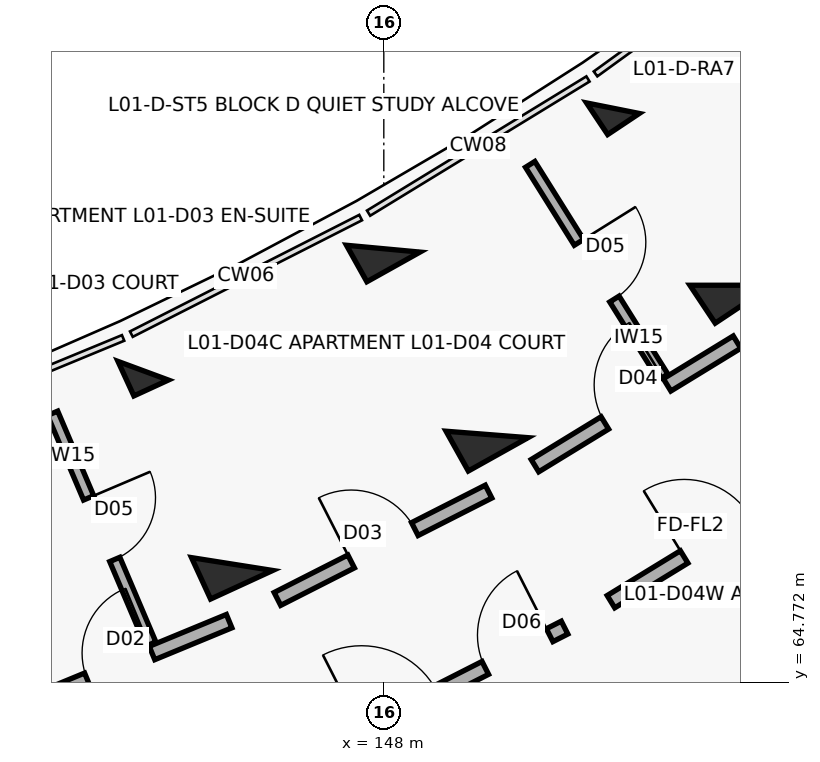
"""IFC4 building model, lengths in metres.
Left out: names, types, materials, properties, quantities, classifications, styles, units other than length and angle.
Written with IfcOpenShell. Run it as: python <this file> out.ifc"""

import sys

from ifc_helpers import new_model, si_unit, direction, frame, frame_2d, origin, origin_2d, place, context, subcontext, project, spatial, rectangle, extrude, element, fill, save


model = new_model("IFC4")
c1 = context("Model", 3, precision=1e-05, world=origin(), true_north=direction((0.0, 1.0)))
c2 = subcontext(c1, "Body", "Model", "MODEL_VIEW")
j1 = project(units=[si_unit("LENGTHUNIT", "METRE"), si_unit("PLANEANGLEUNIT", "RADIAN")], contexts=[c1])
p1 = place(None, origin())
s1 = spatial("IfcSite", under=j1, at=p1, CompositionType="ELEMENT")
p2 = place(p1, origin())
s2 = spatial("IfcBuilding", under=s1, at=p2, CompositionType="ELEMENT")
p3 = place(p2, frame((0.0, 0.0, 4.5)))
s3 = spatial("IfcBuildingStorey", under=s2, at=p3, CompositionType="ELEMENT", Elevation=4.5)
p4 = place(p3, frame((144.834, 68.868, 0.0), z_axis=(0.0, 0.0, 1.0), x_axis=(0.417867073801, -0.908508177527, 0.0)))
e1 = element("IfcColumn", 1, at=p4, inside=s3, PredefinedType="COLUMN", context=c2, shape_type="SweptSolid", body=[
    extrude(rectangle(XDim=0.5, YDim=0.5, at=origin_2d()), origin(), (0.0, 0.0, 1.0), 3.6),
])
p5 = place(p3, frame((146.004, 66.324, 0.0), z_axis=(0.0, 0.0, 1.0), x_axis=(0.417867073801, -0.908508177527, 0.0)))
e2 = element("IfcColumn", 2, at=p5, inside=s3, PredefinedType="COLUMN", context=c2, shape_type="SweptSolid", body=[
    extrude(rectangle(XDim=0.6, YDim=0.9, at=origin_2d()), origin(), (0.0, 0.0, 1.0), 3.6),
])
p6 = place(p3, frame((147.992, 70.474, 0.0), z_axis=(0.0, 0.0, 1.0), x_axis=(0.487859659139, -0.87292207727, 0.0)))
e3 = element("IfcColumn", 3, at=p6, inside=s3, PredefinedType="COLUMN", context=c2, shape_type="SweptSolid", body=[
    extrude(rectangle(XDim=0.55, YDim=0.8, at=origin_2d()), origin(), (0.0, 0.0, 1.0), 3.6),
])
p7 = place(p3, frame((149.358, 68.03, 0.0), z_axis=(0.0, 0.0, 1.0), x_axis=(0.487859659139, -0.87292207727, 0.0)))
e4 = element("IfcColumn", 4, at=p7, inside=s3, PredefinedType="COLUMN", context=c2, shape_type="SweptSolid", body=[
    extrude(rectangle(XDim=0.6, YDim=0.9, at=origin_2d()), origin(), (0.0, 0.0, 1.0), 3.6),
])
p8 = place(p3, frame((151.015, 72.322, 0.0), z_axis=(0.0, 0.0, 1.0), x_axis=(0.554844427448, -0.83195412213, 0.0)))
e5 = element("IfcColumn", 5, at=p8, inside=s3, PredefinedType="COLUMN", context=c2, shape_type="SweptSolid", body=[
    extrude(rectangle(XDim=0.5, YDim=0.5, at=origin_2d()), origin(), (0.0, 0.0, 1.0), 3.6),
])
p9 = place(p3, frame((152.568, 69.993, 0.0), z_axis=(0.0, 0.0, 1.0), x_axis=(0.554844427448, -0.83195412213, 0.0)))
e6 = element("IfcColumn", 6, at=p9, inside=s3, PredefinedType="COLUMN", context=c2, shape_type="SweptSolid", body=[
    extrude(rectangle(XDim=0.6, YDim=0.9, at=origin_2d()), origin(), (0.0, 0.0, 1.0), 3.6),
])
p10 = place(p3, frame((143.085, 64.383, 0.0), z_axis=(0.0, 0.0, 1.0), x_axis=(0.924213340202, 0.381876553081, 0.0)))
e7 = element("IfcWall", 7, at=p10, inside=s3, PredefinedType="SOLIDWALL", context=c2, shape_type="SweptSolid", body=[
    extrude(rectangle(XDim=3.116, YDim=0.19, at=frame_2d((1.558, 0.0))), origin(), (0.0, 0.0, 1.0), 2.58),
])
p11 = place(p10, frame((1.098, 0.0, 0.0)))
e8 = element("IfcOpeningElement", 8, at=p11, cuts=e7, PredefinedType="OPENING", context=c2, shape_type="SweptSolid", body=[
    extrude(rectangle(XDim=0.92, YDim=2.1, at=frame_2d((0.46, 1.05))), frame((0.0, 0.105, 0.0), z_axis=(0.0, -1.0, 0.0), x_axis=(1.0, 0.0, 0.0)), (0.0, 0.0, 1.0), 0.21),
])
p12 = place(p3, frame((143.643, 68.308, 0.0), z_axis=(0.0, 0.0, 1.0), x_axis=(0.391203300693, -0.920304285292, 0.0)))
e9 = element("IfcWall", 9, at=p12, inside=s3, PredefinedType="PARTITIONING", context=c2, shape_type="SweptSolid", body=[
    extrude(rectangle(XDim=3.3, YDim=0.145, at=frame_2d((1.65, 0.0))), origin(), (0.0, 0.0, 1.0), 2.58),
])
p13 = place(p12, frame((1.21, 0.0, 0.0)))
e10 = element("IfcOpeningElement", 10, at=p13, cuts=e9, PredefinedType="OPENING", context=c2, shape_type="SweptSolid", body=[
    extrude(rectangle(XDim=0.88, YDim=2.1, at=frame_2d((0.44, 1.05))), frame((0.0, 0.083, 0.0), z_axis=(0.0, -1.0, 0.0), x_axis=(1.0, 0.0, 0.0)), (0.0, 0.0, 1.0), 0.165),
])
p14 = place(p3, frame((147.457, 64.003, 0.0), z_axis=(0.0, 0.0, 1.0), x_axis=(0.891412167565, 0.45319349898, 0.0)))
e11 = element("IfcWall", 11, at=p14, inside=s3, PredefinedType="SOLIDWALL", context=c2, shape_type="SweptSolid", body=[
    extrude(rectangle(XDim=3.277, YDim=0.19, at=frame_2d((1.639, 0.0))), origin(), (0.0, 0.0, 1.0), 2.58),
])
p15 = place(p14, frame((0.28, 0.0, 0.0)))
e12 = element("IfcOpeningElement", 12, at=p15, cuts=e11, PredefinedType="OPENING", context=c2, shape_type="SweptSolid", body=[
    extrude(rectangle(XDim=1.12, YDim=2.15, at=frame_2d((0.56, 1.075))), frame((0.0, 0.105, 0.0), z_axis=(0.0, -1.0, 0.0), x_axis=(1.0, 0.0, 0.0)), (0.0, 0.0, 1.0), 0.21),
])
p16 = place(p14, frame((2.107, 0.0, 0.0)))
e13 = element("IfcOpeningElement", 13, at=p16, cuts=e11, PredefinedType="OPENING", context=c2, shape_type="SweptSolid", body=[
    extrude(rectangle(XDim=0.95, YDim=2.1, at=frame_2d((0.475, 1.05))), frame((0.0, 0.105, 0.0), z_axis=(0.0, -1.0, 0.0), x_axis=(1.0, 0.0, 0.0)), (0.0, 0.0, 1.0), 0.21),
])
p17 = place(p3, frame((146.6, 65.865, 0.0), z_axis=(0.0, 0.0, 1.0), x_axis=(0.891414101388, 0.453189695212, 0.0)))
e14 = element("IfcWall", 14, at=p17, inside=s3, PredefinedType="SOLIDWALL", context=c2, shape_type="SweptSolid", body=[
    extrude(rectangle(XDim=3.116, YDim=0.19, at=frame_2d((1.558, 0.0))), origin(), (0.0, 0.0, 1.0), 2.58),
])
p18 = place(p17, frame((1.088, 0.0, 0.0)))
e15 = element("IfcOpeningElement", 15, at=p18, cuts=e14, PredefinedType="OPENING", context=c2, shape_type="SweptSolid", body=[
    extrude(rectangle(XDim=0.94, YDim=2.1, at=frame_2d((0.47, 1.05))), frame((0.0, 0.105, 0.0), z_axis=(0.0, -1.0, 0.0), x_axis=(1.0, 0.0, 0.0)), (0.0, 0.0, 1.0), 0.21),
])
p19 = place(p3, frame((150.989, 65.829, 0.0), z_axis=(0.0, 0.0, 1.0), x_axis=(0.853090237845, 0.521763400492, 0.0)))
e16 = element("IfcWall", 16, at=p19, inside=s3, PredefinedType="SOLIDWALL", context=c2, shape_type="SweptSolid", body=[
    extrude(rectangle(XDim=3.277, YDim=0.19, at=frame_2d((1.638, 0.0))), origin(), (0.0, 0.0, 1.0), 2.58),
])
p20 = place(p19, frame((1.128, 0.0, 0.0)))
e17 = element("IfcOpeningElement", 17, at=p20, cuts=e16, PredefinedType="OPENING", context=c2, shape_type="SweptSolid", body=[
    extrude(rectangle(XDim=1.02, YDim=2.15, at=frame_2d((0.51, 1.075))), frame((0.0, 0.105, 0.0), z_axis=(0.0, -1.0, 0.0), x_axis=(1.0, 0.0, 0.0)), (0.0, 0.0, 1.0), 0.21),
])
p21 = place(p3, frame((149.989, 67.619, 0.0), z_axis=(0.0, 0.0, 1.0), x_axis=(0.853121049608, 0.5217130195, 0.0)))
e18 = element("IfcWall", 18, at=p21, inside=s3, PredefinedType="SOLIDWALL", context=c2, shape_type="SweptSolid", body=[
    extrude(rectangle(XDim=3.116, YDim=0.19, at=frame_2d((1.558, 0.0))), origin(), (0.0, 0.0, 1.0), 2.58),
])
p22 = place(p21, frame((1.078, 0.0, 0.0)))
e19 = element("IfcOpeningElement", 19, at=p22, cuts=e18, PredefinedType="OPENING", context=c2, shape_type="SweptSolid", body=[
    extrude(rectangle(XDim=0.96, YDim=2.1, at=frame_2d((0.48, 1.05))), frame((0.0, 0.105, 0.0), z_axis=(0.0, -1.0, 0.0), x_axis=(1.0, 0.0, 0.0)), (0.0, 0.0, 1.0), 0.21),
])
p23 = place(p3, frame((149.926, 71.583, 0.0), z_axis=(0.0, 0.0, 1.0), x_axis=(0.5303779416, -0.847761310196, 0.0)))
e20 = element("IfcWall", 20, at=p23, inside=s3, PredefinedType="PARTITIONING", context=c2, shape_type="SweptSolid", body=[
    extrude(rectangle(XDim=3.3, YDim=0.145, at=frame_2d((1.65, 0.0))), origin(), (0.0, 0.0, 1.0), 2.58),
])
p24 = place(p23, frame((1.21, 0.0, 0.0)))
e21 = element("IfcOpeningElement", 21, at=p24, cuts=e20, PredefinedType="OPENING", context=c2, shape_type="SweptSolid", body=[
    extrude(rectangle(XDim=0.88, YDim=2.1, at=frame_2d((0.44, 1.05))), frame((0.0, 0.083, 0.0), z_axis=(0.0, -1.0, 0.0), x_axis=(1.0, 0.0, 0.0)), (0.0, 0.0, 1.0), 0.165),
])
p25 = place(p3, frame((152.434, 63.141, 0.0), z_axis=(0.0, 0.0, 1.0), x_axis=(0.853089873067, 0.521763996909, 0.0)))
e22 = element("IfcWall", 22, at=p25, inside=s3, PredefinedType="PARTITIONING", context=c2, shape_type="SweptSolid", body=[
    extrude(rectangle(XDim=3.616, YDim=0.125, at=frame_2d((1.808, 0.0))), origin(), (0.0, 0.0, 1.0), 2.58),
])
p26 = place(p25, frame((0.65, 0.0, 0.0)))
e23 = element("IfcOpeningElement", 23, at=p26, cuts=e22, PredefinedType="OPENING", context=c2, shape_type="SweptSolid", body=[
    extrude(rectangle(XDim=0.9, YDim=2.1, at=frame_2d((0.45, 1.05))), frame((0.0, 0.073, 0.0), z_axis=(0.0, -1.0, 0.0), x_axis=(1.0, 0.0, 0.0)), (0.0, 0.0, 1.0), 0.145),
])
p27 = place(p25, frame((2.086, 0.0, 0.0)))
e24 = element("IfcOpeningElement", 24, at=p27, cuts=e22, PredefinedType="OPENING", context=c2, shape_type="SweptSolid", body=[
    extrude(rectangle(XDim=0.88, YDim=2.1, at=frame_2d((0.44, 1.05))), frame((0.0, 0.073, 0.0), z_axis=(0.0, -1.0, 0.0), x_axis=(1.0, 0.0, 0.0)), (0.0, 0.0, 1.0), 0.145),
])
p28 = place(p11, origin())
e25 = element("IfcDoor", 25, at=p28, inside=s3, OperationType="SINGLE_SWING_RIGHT", PredefinedType="DOOR", context=c2, shape_type="SweptSolid", body=[
    extrude(rectangle(XDim=0.92, YDim=2.1, at=frame_2d((0.46, 1.05))), frame((0.0, 0.025, 0.0), z_axis=(0.0, -1.0, 0.0), x_axis=(1.0, 0.0, 0.0)), (0.0, 0.0, 1.0), 0.05),
])
fill(e8, e25)
p29 = place(p13, origin())
e26 = element("IfcDoor", 26, at=p29, inside=s3, OperationType="SINGLE_SWING_LEFT", PredefinedType="DOOR", context=c2, shape_type="SweptSolid", body=[
    extrude(rectangle(XDim=0.88, YDim=2.1, at=frame_2d((0.44, 1.05))), frame((0.0, 0.025, 0.0), z_axis=(0.0, -1.0, 0.0), x_axis=(1.0, 0.0, 0.0)), (0.0, 0.0, 1.0), 0.05),
])
fill(e10, e26)
p30 = place(p16, origin())
e27 = element("IfcDoor", 27, at=p30, inside=s3, OperationType="SINGLE_SWING_RIGHT", PredefinedType="DOOR", context=c2, shape_type="SweptSolid", body=[
    extrude(rectangle(XDim=0.95, YDim=2.1, at=frame_2d((0.475, 1.05))), frame((0.0, 0.025, 0.0), z_axis=(0.0, -1.0, 0.0), x_axis=(1.0, 0.0, 0.0)), (0.0, 0.0, 1.0), 0.05),
])
fill(e13, e27)
p31 = place(p18, origin())
e28 = element("IfcDoor", 28, at=p31, inside=s3, OperationType="SINGLE_SWING_LEFT", PredefinedType="DOOR", context=c2, shape_type="SweptSolid", body=[
    extrude(rectangle(XDim=0.94, YDim=2.1, at=frame_2d((0.47, 1.05))), frame((0.0, 0.025, 0.0), z_axis=(0.0, -1.0, 0.0), x_axis=(1.0, 0.0, 0.0)), (0.0, 0.0, 1.0), 0.05),
])
fill(e15, e28)
p32 = place(p20, origin())
e29 = element("IfcDoor", 29, at=p32, inside=s3, OperationType="SINGLE_SWING_LEFT", PredefinedType="DOOR", context=c2, shape_type="SweptSolid", body=[
    extrude(rectangle(XDim=1.02, YDim=2.15, at=frame_2d((0.51, 1.075))), frame((0.0, 0.025, 0.0), z_axis=(0.0, -1.0, 0.0), x_axis=(1.0, 0.0, 0.0)), (0.0, 0.0, 1.0), 0.05),
])
fill(e17, e29)
p33 = place(p22, origin())
e30 = element("IfcDoor", 30, at=p33, inside=s3, OperationType="SINGLE_SWING_RIGHT", PredefinedType="DOOR", context=c2, shape_type="SweptSolid", body=[
    extrude(rectangle(XDim=0.96, YDim=2.1, at=frame_2d((0.48, 1.05))), frame((0.0, 0.025, 0.0), z_axis=(0.0, -1.0, 0.0), x_axis=(1.0, 0.0, 0.0)), (0.0, 0.0, 1.0), 0.05),
])
fill(e19, e30)
p34 = place(p24, origin())
e31 = element("IfcDoor", 31, at=p34, inside=s3, OperationType="SINGLE_SWING_LEFT", PredefinedType="DOOR", context=c2, shape_type="SweptSolid", body=[
    extrude(rectangle(XDim=0.88, YDim=2.1, at=frame_2d((0.44, 1.05))), frame((0.0, 0.025, 0.0), z_axis=(0.0, -1.0, 0.0), x_axis=(1.0, 0.0, 0.0)), (0.0, 0.0, 1.0), 0.05),
])
fill(e21, e31)
save(model, sys.argv[1])
